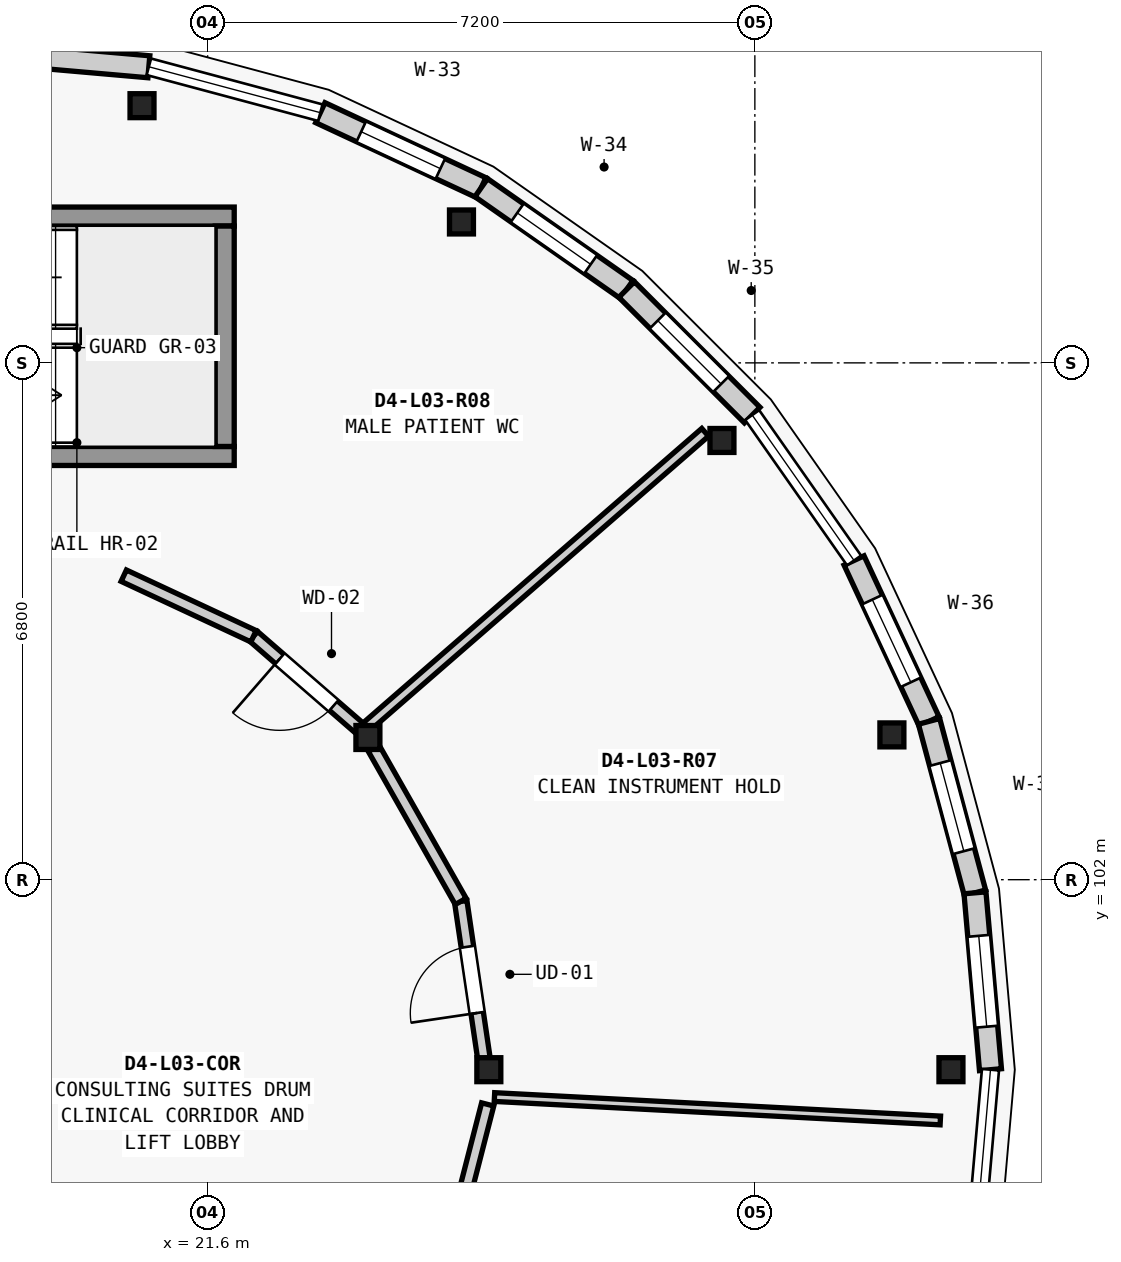
"""IFC4 building model, lengths in metres.
Left out: names, types, materials, properties, quantities, classifications, styles, units other than length and angle.
Written with IfcOpenShell. Run it as: python <this file> out.ifc"""

import sys

from ifc_helpers import new_model, si_unit, direction, frame, frame_2d, origin, origin_2d, place, context, subcontext, project, spatial, rectangle, extrude, element, fill, save


model = new_model("IFC4")
c1 = context("Model", 3, precision=1e-05, world=origin(), true_north=direction((0.0, 1.0)))
c2 = subcontext(c1, "Body", "Model", "MODEL_VIEW")
j1 = project(units=[si_unit("LENGTHUNIT", "METRE"), si_unit("PLANEANGLEUNIT", "RADIAN")], contexts=[c1])
p1 = place(None, origin())
s1 = spatial("IfcSite", under=j1, at=p1, CompositionType="ELEMENT")
p2 = place(p1, origin())
s2 = spatial("IfcBuilding", under=s1, at=p2, CompositionType="ELEMENT")
p3 = place(p2, frame((0.0, 0.0, 12.95)))
s3 = spatial("IfcBuildingStorey", under=s2, at=p3, CompositionType="ELEMENT", Elevation=12.95)
for number, where, z_axis, x_axis in (
    (1, (31.38, 99.5, 0.0), (0.0, 0.0, 1.0), (1.0, 0.0, 0.0)),
    (2, (30.603, 103.905, 0.0), (0.0, 0.0, 1.0), (1.0, 0.0, 0.0)),
    (3, (28.367, 107.779, 0.0), (0.0, 0.0, 1.0), (1.0, 0.0, 0.0)),
    (4, (24.94, 110.654, 0.0), (0.0, 0.0, 1.0), (1.0, 0.0, 0.0)),
    (5, (20.737, 112.184, 0.0), (0.0, 0.0, 1.0), (1.0, 0.0, 0.0)),
    (6, (25.3, 99.5, 0.0), (0.0, 0.0, 1.0), (1.0, 0.0, 0.0)),
    (7, (23.709, 103.871, 0.0), (0.0, 0.0, 1.0), (1.0, 0.0, 0.0)),
):
    element("IfcColumn", number, at=place(p3, frame(where, z_axis=z_axis, x_axis=x_axis)), inside=s3, PredefinedType="COLUMN", context=c2, shape_type="SweptSolid", body=[
        extrude(rectangle(XDim=0.315, YDim=0.315, at=origin_2d()), origin(), (0.0, 0.0, 1.0), 4.2),
    ])
p4 = place(p3, frame((18.5, 112.9, 0.0), z_axis=(0.0, 0.0, 1.0), x_axis=(0.996184295282, -0.087274565792, 0.0)))
e8 = element("IfcWall", 8, at=p4, inside=s3, PredefinedType="ELEMENTEDWALL", context=c2, shape_type="SweptSolid", body=[
    extrude(rectangle(XDim=2.336, YDim=0.29, at=frame_2d((1.168, 0.0))), origin(), (0.0, 0.0, 1.0), 3.349),
])
p5 = place(p3, frame((23.083, 112.092, 0.0), z_axis=(0.0, 0.0, 1.0), x_axis=(0.906321946979, -0.422587894318, 0.0)))
e9 = element("IfcWall", 9, at=p5, inside=s3, PredefinedType="ELEMENTEDWALL", context=c2, shape_type="SweptSolid", body=[
    extrude(rectangle(XDim=2.336, YDim=0.29, at=frame_2d((1.168, 0.0))), origin(), (0.0, 0.0, 1.0), 3.349),
])
p6 = place(p5, frame((0.593, 0.0, 0.85)))
e10 = element("IfcOpeningElement", 10, at=p6, cuts=e9, PredefinedType="OPENING", context=c2, shape_type="SweptSolid", body=[
    extrude(rectangle(XDim=1.15, YDim=2.25, at=frame_2d((0.575, 1.125))), frame((0.0, 0.155, 0.0), z_axis=(0.0, -1.0, 0.0), x_axis=(1.0, 0.0, 0.0)), (0.0, 0.0, 1.0), 0.31),
])
p7 = place(p3, frame((25.2, 111.105, 0.0), z_axis=(0.0, 0.0, 1.0), x_axis=(0.819045278347, -0.573728883722, 0.0)))
e11 = element("IfcWall", 11, at=p7, inside=s3, PredefinedType="ELEMENTEDWALL", context=c2, shape_type="SweptSolid", body=[
    extrude(rectangle(XDim=2.336, YDim=0.29, at=frame_2d((1.168, 0.0))), origin(), (0.0, 0.0, 1.0), 3.349),
])
p8 = place(p7, frame((0.578, 0.0, 0.85)))
e12 = element("IfcOpeningElement", 12, at=p8, cuts=e11, PredefinedType="OPENING", context=c2, shape_type="SweptSolid", body=[
    extrude(rectangle(XDim=1.18, YDim=1.55, at=frame_2d((0.59, 0.775))), frame((0.0, 0.155, 0.0), z_axis=(0.0, -1.0, 0.0), x_axis=(1.0, 0.0, 0.0)), (0.0, 0.0, 1.0), 0.31),
])
p9 = place(p3, frame((27.113, 109.765, 0.0), z_axis=(0.0, 0.0, 1.0), x_axis=(0.707106781187, -0.707106781187, 0.0)))
e13 = element("IfcWall", 13, at=p9, inside=s3, PredefinedType="ELEMENTEDWALL", context=c2, shape_type="SweptSolid", body=[
    extrude(rectangle(XDim=2.336, YDim=0.29, at=frame_2d((1.168, 0.0))), origin(), (0.0, 0.0, 1.0), 3.349),
])
p10 = place(p9, frame((0.578, 0.0, 0.85)))
e14 = element("IfcOpeningElement", 14, at=p10, cuts=e13, PredefinedType="OPENING", context=c2, shape_type="SweptSolid", body=[
    extrude(rectangle(XDim=1.18, YDim=1.85, at=frame_2d((0.59, 0.925))), frame((0.0, 0.155, 0.0), z_axis=(0.0, -1.0, 0.0), x_axis=(1.0, 0.0, 0.0)), (0.0, 0.0, 1.0), 0.31),
])
p11 = place(p3, frame((30.105, 106.2, 0.0), z_axis=(0.0, 0.0, 1.0), x_axis=(0.422587894318, -0.906321946979, 0.0)))
e15 = element("IfcWall", 15, at=p11, inside=s3, PredefinedType="ELEMENTEDWALL", context=c2, shape_type="SweptSolid", body=[
    extrude(rectangle(XDim=2.336, YDim=0.29, at=frame_2d((1.168, 0.0))), origin(), (0.0, 0.0, 1.0), 3.349),
])
p12 = place(p11, frame((0.568, 0.0, 0.85)))
e16 = element("IfcOpeningElement", 16, at=p12, cuts=e15, PredefinedType="OPENING", context=c2, shape_type="SweptSolid", body=[
    extrude(rectangle(XDim=1.2, YDim=1.35, at=frame_2d((0.6, 0.675))), frame((0.0, 0.155, 0.0), z_axis=(0.0, -1.0, 0.0), x_axis=(1.0, 0.0, 0.0)), (0.0, 0.0, 1.0), 0.31),
])
p13 = place(p3, frame((31.092, 104.083, 0.0), z_axis=(0.0, 0.0, 1.0), x_axis=(0.258612423585, -0.965981166673, 0.0)))
e17 = element("IfcWall", 17, at=p13, inside=s3, PredefinedType="ELEMENTEDWALL", context=c2, shape_type="SweptSolid", body=[
    extrude(rectangle(XDim=2.335, YDim=0.29, at=frame_2d((1.168, 0.0))), origin(), (0.0, 0.0, 1.0), 3.349),
])
p14 = place(p13, frame((0.568, 0.0, 0.85)))
e18 = element("IfcOpeningElement", 18, at=p14, cuts=e17, PredefinedType="OPENING", context=c2, shape_type="SweptSolid", body=[
    extrude(rectangle(XDim=1.2, YDim=1.65, at=frame_2d((0.6, 0.825))), frame((0.0, 0.155, 0.0), z_axis=(0.0, -1.0, 0.0), x_axis=(1.0, 0.0, 0.0)), (0.0, 0.0, 1.0), 0.31),
])
p15 = place(p3, frame((31.696, 101.827, 0.0), z_axis=(0.0, 0.0, 1.0), x_axis=(0.087274565792, -0.996184295282, 0.0)))
e19 = element("IfcWall", 19, at=p15, inside=s3, PredefinedType="ELEMENTEDWALL", context=c2, shape_type="SweptSolid", body=[
    extrude(rectangle(XDim=2.336, YDim=0.29, at=frame_2d((1.168, 0.0))), origin(), (0.0, 0.0, 1.0), 3.349),
])
p16 = place(p15, frame((0.568, 0.0, 0.85)))
e20 = element("IfcOpeningElement", 20, at=p16, cuts=e19, PredefinedType="OPENING", context=c2, shape_type="SweptSolid", body=[
    extrude(rectangle(XDim=1.2, YDim=1.95, at=frame_2d((0.6, 0.975))), frame((0.0, 0.155, 0.0), z_axis=(0.0, -1.0, 0.0), x_axis=(1.0, 0.0, 0.0)), (0.0, 0.0, 1.0), 0.31),
])
p17 = place(p3, frame((15.05, 107.575, 0.0), z_axis=(0.0, 0.0, 1.0), x_axis=(1.0, 0.0, 0.0)))
e21 = element("IfcWall", 21, at=p17, inside=s3, PredefinedType="SHEAR", context=c2, shape_type="SweptSolid", body=[
    extrude(rectangle(XDim=6.9, YDim=0.25, at=frame_2d((3.45, 0.0))), origin(), (0.0, 0.0, 1.0), 3.995),
])
p18 = place(p17, frame((0.43, 0.0, 0.0)))
e22 = element("IfcOpeningElement", 22, at=p18, cuts=e21, PredefinedType="OPENING", context=c2, shape_type="SweptSolid", body=[
    extrude(rectangle(XDim=1.1, YDim=2.15, at=frame_2d((0.55, 1.075))), frame((0.0, 0.135, 0.0), z_axis=(0.0, -1.0, 0.0), x_axis=(1.0, 0.0, 0.0)), (0.0, 0.0, 1.0), 0.27),
])
p19 = place(p3, frame((15.05, 110.725, 0.0), z_axis=(0.0, 0.0, 1.0), x_axis=(1.0, 0.0, 0.0)))
e23 = element("IfcWall", 23, at=p19, inside=s3, PredefinedType="SHEAR", context=c2, shape_type="SweptSolid", body=[
    extrude(rectangle(XDim=6.9, YDim=0.25, at=frame_2d((3.45, 0.0))), origin(), (0.0, 0.0, 1.0), 3.995),
])
p20 = place(p3, frame((21.825, 107.7, 0.0), z_axis=(0.0, 0.0, 1.0), x_axis=(0.0, 1.0, 0.0)))
e24 = element("IfcWall", 24, at=p20, inside=s3, PredefinedType="SHEAR", context=c2, shape_type="SweptSolid", body=[
    extrude(rectangle(XDim=2.9, YDim=0.25, at=frame_2d((1.45, 0.0))), origin(), (0.0, 0.0, 1.0), 3.995),
])
p21 = place(p3, frame((25.374, 99.14, 0.0), z_axis=(0.0, 0.0, 1.0), x_axis=(0.998625625662, -0.052410492944, 0.0)))
e25 = element("IfcWall", 25, at=p21, inside=s3, PredefinedType="PARTITIONING", context=c2, shape_type="SweptSolid", body=[
    extrude(rectangle(XDim=5.874, YDim=0.115, at=frame_2d((2.937, 0.0))), origin(), (0.0, 0.0, 1.0), 3.324),
])
p22 = place(p3, frame((23.695, 104.016, 0.0), z_axis=(0.0, 0.0, 1.0), x_axis=(0.754647404393, 0.656130547256, 0.0)))
e26 = element("IfcWall", 26, at=p22, inside=s3, PredefinedType="PLUMBINGWALL", context=c2, shape_type="SweptSolid", body=[
    extrude(rectangle(XDim=5.898, YDim=0.135, at=frame_2d((2.949, 0.0))), origin(), (0.0, 0.0, 1.0), 3.324),
])
p23 = place(p3, frame((24.663, 96.626, 0.0), z_axis=(0.0, 0.0, 1.0), x_axis=(0.249159011618, 0.968462589329, 0.0)))
e27 = element("IfcWall", 27, at=p23, inside=s3, PredefinedType="PARTITIONING", context=c2, shape_type="SweptSolid", body=[
    extrude(rectangle(XDim=2.496, YDim=0.165, at=frame_2d((1.248, 0.0))), origin(), (0.0, 0.0, 1.0), 3.324),
])
p24 = place(p3, frame((25.235, 99.649, 0.0), z_axis=(0.0, 0.0, 1.0), x_axis=(-0.14618415224, 0.989257395036, 0.0)))
e28 = element("IfcWall", 28, at=p24, inside=s3, PredefinedType="PARTITIONING", context=c2, shape_type="SweptSolid", body=[
    extrude(rectangle(XDim=2.088, YDim=0.165, at=frame_2d((1.044, 0.0))), origin(), (0.0, 0.0, 1.0), 3.324),
])
p25 = place(p24, frame((0.604, 0.0, 0.0)))
e29 = element("IfcOpeningElement", 29, at=p25, cuts=e28, PredefinedType="OPENING", context=c2, shape_type="SweptSolid", body=[
    extrude(rectangle(XDim=0.88, YDim=2.1, at=frame_2d((0.44, 1.05))), frame((0.0, 0.093, 0.0), z_axis=(0.0, -1.0, 0.0), x_axis=(1.0, 0.0, 0.0)), (0.0, 0.0, 1.0), 0.185),
])
p26 = place(p3, frame((24.93, 101.714, 0.0), z_axis=(0.0, 0.0, 1.0), x_axis=(-0.493935156124, 0.869498741543, 0.0)))
e30 = element("IfcWall", 30, at=p26, inside=s3, PredefinedType="PARTITIONING", context=c2, shape_type="SweptSolid", body=[
    extrude(rectangle(XDim=2.316, YDim=0.165, at=frame_2d((1.158, 0.0))), origin(), (0.0, 0.0, 1.0), 3.324),
])
p27 = place(p3, frame((23.6, 103.991, 0.0), z_axis=(0.0, 0.0, 1.0), x_axis=(-0.755139781187, 0.65556381144, 0.0)))
e31 = element("IfcWall", 31, at=p27, inside=s3, PredefinedType="PARTITIONING", context=c2, shape_type="SweptSolid", body=[
    extrude(rectangle(XDim=1.849, YDim=0.165, at=frame_2d((0.924, 0.0))), origin(), (0.0, 0.0, 1.0), 3.324),
])
p28 = place(p27, frame((0.454, 0.0, 0.0)))
e32 = element("IfcOpeningElement", 32, at=p28, cuts=e31, PredefinedType="OPENING", context=c2, shape_type="SweptSolid", body=[
    extrude(rectangle(XDim=0.94, YDim=2.1, at=frame_2d((0.47, 1.05))), frame((0.0, 0.093, 0.0), z_axis=(0.0, -1.0, 0.0), x_axis=(1.0, 0.0, 0.0)), (0.0, 0.0, 1.0), 0.185),
])
p29 = place(p3, frame((22.204, 105.203, 0.0), z_axis=(0.0, 0.0, 1.0), x_axis=(-0.906080483262, 0.423105374407, 0.0)))
e33 = element("IfcWall", 33, at=p29, inside=s3, PredefinedType="PARTITIONING", context=c2, shape_type="SweptSolid", body=[
    extrude(rectangle(XDim=1.884, YDim=0.165, at=frame_2d((0.942, 0.0))), origin(), (0.0, 0.0, 1.0), 3.324),
])
p30 = place(p6, origin())
e34 = element("IfcWindow", 34, at=p30, inside=s3, PartitioningType="SINGLE_PANEL", PredefinedType="WINDOW", context=c2, shape_type="SweptSolid", body=[
    extrude(rectangle(XDim=1.15, YDim=2.25, at=frame_2d((0.575, 1.125))), frame((0.0, 0.03, 0.0), z_axis=(0.0, -1.0, 0.0), x_axis=(1.0, 0.0, 0.0)), (0.0, 0.0, 1.0), 0.06),
])
fill(e10, e34)
p31 = place(p8, origin())
e35 = element("IfcWindow", 35, at=p31, inside=s3, PartitioningType="SINGLE_PANEL", PredefinedType="WINDOW", context=c2, shape_type="SweptSolid", body=[
    extrude(rectangle(XDim=1.18, YDim=1.55, at=frame_2d((0.59, 0.775))), frame((0.0, 0.03, 0.0), z_axis=(0.0, -1.0, 0.0), x_axis=(1.0, 0.0, 0.0)), (0.0, 0.0, 1.0), 0.06),
])
fill(e12, e35)
p32 = place(p10, origin())
e36 = element("IfcWindow", 36, at=p32, inside=s3, PartitioningType="SINGLE_PANEL", PredefinedType="WINDOW", context=c2, shape_type="SweptSolid", body=[
    extrude(rectangle(XDim=1.18, YDim=1.85, at=frame_2d((0.59, 0.925))), frame((0.0, 0.03, 0.0), z_axis=(0.0, -1.0, 0.0), x_axis=(1.0, 0.0, 0.0)), (0.0, 0.0, 1.0), 0.06),
])
fill(e14, e36)
p33 = place(p12, origin())
e37 = element("IfcWindow", 37, at=p33, inside=s3, PartitioningType="SINGLE_PANEL", PredefinedType="WINDOW", context=c2, shape_type="SweptSolid", body=[
    extrude(rectangle(XDim=1.2, YDim=1.35, at=frame_2d((0.6, 0.675))), frame((0.0, 0.03, 0.0), z_axis=(0.0, -1.0, 0.0), x_axis=(1.0, 0.0, 0.0)), (0.0, 0.0, 1.0), 0.06),
])
fill(e16, e37)
p34 = place(p14, origin())
e38 = element("IfcWindow", 38, at=p34, inside=s3, PartitioningType="SINGLE_PANEL", PredefinedType="WINDOW", context=c2, shape_type="SweptSolid", body=[
    extrude(rectangle(XDim=1.2, YDim=1.65, at=frame_2d((0.6, 0.825))), frame((0.0, 0.03, 0.0), z_axis=(0.0, -1.0, 0.0), x_axis=(1.0, 0.0, 0.0)), (0.0, 0.0, 1.0), 0.06),
])
fill(e18, e38)
p35 = place(p16, origin())
e39 = element("IfcWindow", 39, at=p35, inside=s3, PartitioningType="SINGLE_PANEL", PredefinedType="WINDOW", context=c2, shape_type="SweptSolid", body=[
    extrude(rectangle(XDim=1.2, YDim=1.95, at=frame_2d((0.6, 0.975))), frame((0.0, 0.03, 0.0), z_axis=(0.0, -1.0, 0.0), x_axis=(1.0, 0.0, 0.0)), (0.0, 0.0, 1.0), 0.06),
])
fill(e20, e39)
p36 = place(p25, origin())
e40 = element("IfcDoor", 40, at=p36, inside=s3, OperationType="SINGLE_SWING_LEFT", PredefinedType="DOOR", context=c2, shape_type="SweptSolid", body=[
    extrude(rectangle(XDim=0.88, YDim=2.1, at=frame_2d((0.44, 1.05))), frame((0.0, 0.025, 0.0), z_axis=(0.0, -1.0, 0.0), x_axis=(1.0, 0.0, 0.0)), (0.0, 0.0, 1.0), 0.05),
])
fill(e29, e40)
p37 = place(p28, origin())
e41 = element("IfcDoor", 41, at=p37, inside=s3, OperationType="SINGLE_SWING_RIGHT", PredefinedType="DOOR", context=c2, shape_type="SweptSolid", body=[
    extrude(rectangle(XDim=0.94, YDim=2.1, at=frame_2d((0.47, 1.05))), frame((0.0, 0.025, 0.0), z_axis=(0.0, -1.0, 0.0), x_axis=(1.0, 0.0, 0.0)), (0.0, 0.0, 1.0), 0.05),
])
fill(e32, e41)
save(model, sys.argv[1])
